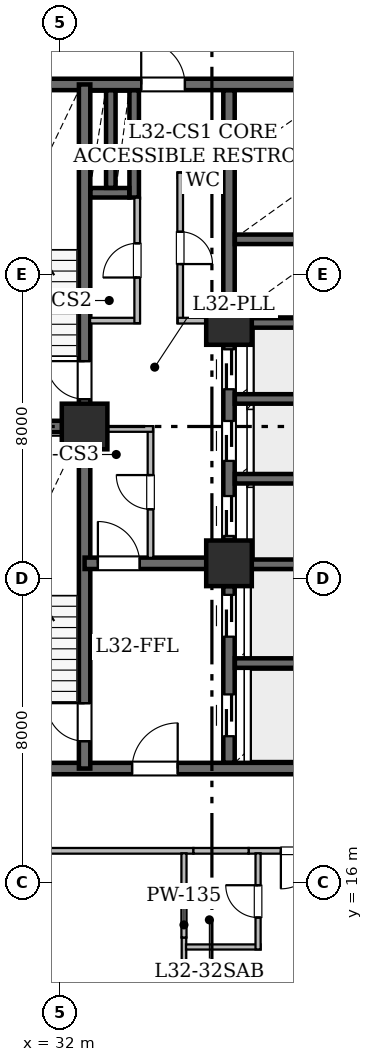
"""IFC4 building model, lengths in metres.
Left out: names, types, materials, properties, quantities, classifications, styles, units other than length and angle.
Written with IfcOpenShell. Run it as: python <this file> out.ifc"""

import sys

from ifc_helpers import new_model, si_unit, direction, frame, frame_2d, origin, origin_2d, place, context, subcontext, project, spatial, rectangle, hollow_rectangle, extrude, element, fill, save


model = new_model("IFC4")
c1 = context("Model", 3, precision=1e-05, world=origin(), true_north=direction((0.0, 1.0)))
c2 = subcontext(c1, "Body", "Model", "MODEL_VIEW")
j1 = project(units=[si_unit("LENGTHUNIT", "METRE"), si_unit("PLANEANGLEUNIT", "RADIAN")], contexts=[c1])
p1 = place(None, origin())
s1 = spatial("IfcSite", under=j1, at=p1, CompositionType="ELEMENT")
p2 = place(p1, origin())
s2 = spatial("IfcBuilding", under=s1, at=p2, CompositionType="ELEMENT")
p3 = place(p2, frame((0.0, 0.0, 127.45)))
s3 = spatial("IfcBuildingStorey", under=s2, at=p3, CompositionType="ELEMENT", Elevation=127.45)
for number, where, z_axis, x_axis in (
    (1, (32.65, 28.0, 0.0), (0.0, 0.0, 1.0), (1.0, 0.0, 0.0)),
    (2, (36.45, 24.4, 0.0), (0.0, 0.0, 1.0), (1.0, 0.0, 0.0)),
    (3, (36.45, 30.75, 0.0), (0.0, 0.0, 1.0), (1.0, 0.0, 0.0)),
):
    element("IfcColumn", number, at=place(p3, frame(where, z_axis=z_axis, x_axis=x_axis)), inside=s3, PredefinedType="COLUMN", context=c2, shape_type="SweptSolid", body=[
        extrude(hollow_rectangle(XDim=1.2, YDim=1.2, WallThickness=0.06, at=origin_2d()), origin(), (0.0, 0.0, 1.0), 3.65),
    ])
p4 = place(p3, frame((29.0, 19.0, 0.0), z_axis=(0.0, 0.0, 1.0), x_axis=(1.0, 0.0, 0.0)))
e4 = element("IfcWall", 4, at=p4, inside=s3, PredefinedType="SHEAR", context=c2, shape_type="SweptSolid", body=[
    extrude(rectangle(XDim=10.4, YDim=0.3, at=frame_2d((5.2, 0.0))), origin(), (0.0, 0.0, 1.0), 3.43),
])
p5 = place(p4, frame((4.9, 0.0, 0.0)))
e5 = element("IfcOpeningElement", 5, at=p5, cuts=e4, PredefinedType="OPENING", context=c2, shape_type="SweptSolid", body=[
    extrude(rectangle(XDim=1.2, YDim=2.15, at=frame_2d((0.6, 1.075))), frame((0.0, 0.16, 0.0), z_axis=(0.0, -1.0, 0.0), x_axis=(1.0, 0.0, 0.0)), (0.0, 0.0, 1.0), 0.32),
])
p6 = place(p3, frame((29.0, 37.0, 0.0), z_axis=(0.0, 0.0, 1.0), x_axis=(1.0, 0.0, 0.0)))
e6 = element("IfcWall", 6, at=p6, inside=s3, PredefinedType="SHEAR", context=c2, shape_type="SweptSolid", body=[
    extrude(rectangle(XDim=10.4, YDim=0.3, at=frame_2d((5.2, 0.0))), origin(), (0.0, 0.0, 1.0), 3.43),
])
p7 = place(p6, frame((5.14, 0.0, 0.0)))
e7 = element("IfcOpeningElement", 7, at=p7, cuts=e6, PredefinedType="OPENING", context=c2, shape_type="SweptSolid", body=[
    extrude(rectangle(XDim=1.15, YDim=2.2, at=frame_2d((0.575, 1.1))), frame((0.0, 0.16, 0.0), z_axis=(0.0, -1.0, 0.0), x_axis=(1.0, 0.0, 0.0)), (0.0, 0.0, 1.0), 0.32),
])
p8 = place(p3, frame((32.65, 19.0, 0.0), z_axis=(0.0, 0.0, 1.0), x_axis=(0.0, 1.0, 0.0)))
e8 = element("IfcWall", 8, at=p8, inside=s3, PredefinedType="SHEAR", context=c2, shape_type="SweptSolid", body=[
    extrude(rectangle(XDim=9.0, YDim=0.3, at=frame_2d((4.5, 0.0))), origin(), (0.0, 0.0, 1.0), 3.43),
])
p9 = place(p8, frame((0.72, 0.0, 0.0)))
e9 = element("IfcOpeningElement", 9, at=p9, cuts=e8, PredefinedType="OPENING", context=c2, shape_type="SweptSolid", body=[
    extrude(rectangle(XDim=1.0, YDim=2.15, at=frame_2d((0.5, 1.075))), frame((0.0, 0.16, 0.0), z_axis=(0.0, -1.0, 0.0), x_axis=(1.0, 0.0, 0.0)), (0.0, 0.0, 1.0), 0.32),
])
p10 = place(p3, frame((32.65, 28.0, 0.0), z_axis=(0.0, 0.0, 1.0), x_axis=(0.0, 1.0, 0.0)))
e10 = element("IfcWall", 10, at=p10, inside=s3, PredefinedType="SHEAR", context=c2, shape_type="SweptSolid", body=[
    extrude(rectangle(XDim=9.0, YDim=0.3, at=frame_2d((4.5, 0.0))), origin(), (0.0, 0.0, 1.0), 3.43),
])
p11 = place(p10, frame((0.72, 0.0, 0.0)))
e11 = element("IfcOpeningElement", 11, at=p11, cuts=e10, PredefinedType="OPENING", context=c2, shape_type="SweptSolid", body=[
    extrude(rectangle(XDim=1.0, YDim=2.15, at=frame_2d((0.5, 1.075))), frame((0.0, 0.16, 0.0), z_axis=(0.0, -1.0, 0.0), x_axis=(1.0, 0.0, 0.0)), (0.0, 0.0, 1.0), 0.32),
])
p12 = place(p3, frame((29.0, 28.0, 0.0), z_axis=(0.0, 0.0, 1.0), x_axis=(1.0, 0.0, 0.0)))
e12 = element("IfcWall", 12, at=p12, inside=s3, PredefinedType="SHEAR", context=c2, shape_type="SweptSolid", body=[
    extrude(rectangle(XDim=3.65, YDim=0.3, at=frame_2d((1.825, 0.0))), origin(), (0.0, 0.0, 1.0), 3.43),
])
p13 = place(p3, frame((32.65, 24.4, 0.0), z_axis=(0.0, 0.0, 1.0), x_axis=(1.0, 0.0, 0.0)))
e13 = element("IfcWall", 13, at=p13, inside=s3, PredefinedType="SHEAR", context=c2, shape_type="SweptSolid", body=[
    extrude(rectangle(XDim=3.8, YDim=0.3, at=frame_2d((1.9, 0.0))), origin(), (0.0, 0.0, 1.0), 3.43),
])
p14 = place(p13, frame((0.35, 0.0, 0.0)))
e14 = element("IfcOpeningElement", 14, at=p14, cuts=e13, PredefinedType="OPENING", context=c2, shape_type="SweptSolid", body=[
    extrude(rectangle(XDim=1.1, YDim=2.15, at=frame_2d((0.55, 1.075))), frame((0.0, 0.16, 0.0), z_axis=(0.0, -1.0, 0.0), x_axis=(1.0, 0.0, 0.0)), (0.0, 0.0, 1.0), 0.32),
])
p15 = place(p3, frame((36.45, 19.154, 0.0), z_axis=(0.0, 0.0, 1.0), x_axis=(0.0, 1.0, 0.0)))
e15 = element("IfcWall", 15, at=p15, inside=s3, PredefinedType="SHEAR", context=c2, shape_type="SweptSolid", body=[
    extrude(rectangle(XDim=4.646, YDim=0.3, at=frame_2d((2.323, 0.0))), origin(), (0.0, 0.0, 1.0), 3.43),
])
p16 = place(p15, frame((0.696, 0.0, 0.0)))
e16 = element("IfcOpeningElement", 16, at=p16, cuts=e15, PredefinedType="OPENING", context=c2, shape_type="SweptSolid", body=[
    extrude(rectangle(XDim=1.1, YDim=2.15, at=frame_2d((0.55, 1.075))), frame((0.0, 0.16, 0.0), z_axis=(0.0, -1.0, 0.0), x_axis=(1.0, 0.0, 0.0)), (0.0, 0.0, 1.0), 0.32),
])
p17 = place(p15, frame((3.316, 0.0, 0.0)))
e17 = element("IfcOpeningElement", 17, at=p17, cuts=e15, PredefinedType="OPENING", context=c2, shape_type="SweptSolid", body=[
    extrude(rectangle(XDim=1.1, YDim=2.15, at=frame_2d((0.55, 1.075))), frame((0.0, 0.16, 0.0), z_axis=(0.0, -1.0, 0.0), x_axis=(1.0, 0.0, 0.0)), (0.0, 0.0, 1.0), 0.32),
])
p18 = place(p3, frame((36.45, 25.0, 0.0), z_axis=(0.0, 0.0, 1.0), x_axis=(0.0, 1.0, 0.0)))
e18 = element("IfcWall", 18, at=p18, inside=s3, PredefinedType="SHEAR", context=c2, shape_type="SweptSolid", body=[
    extrude(rectangle(XDim=5.15, YDim=0.3, at=frame_2d((2.575, 0.0))), origin(), (0.0, 0.0, 1.0), 3.43),
])
p19 = place(p18, frame((0.12, 0.0, 0.0)))
e19 = element("IfcOpeningElement", 19, at=p19, cuts=e18, PredefinedType="OPENING", context=c2, shape_type="SweptSolid", body=[
    extrude(rectangle(XDim=1.05, YDim=2.15, at=frame_2d((0.525, 1.075))), frame((0.0, 0.16, 0.0), z_axis=(0.0, -1.0, 0.0), x_axis=(1.0, 0.0, 0.0)), (0.0, 0.0, 1.0), 0.32),
])
p20 = place(p18, frame((2.095, 0.0, 0.0)))
e20 = element("IfcOpeningElement", 20, at=p20, cuts=e18, PredefinedType="OPENING", context=c2, shape_type="SweptSolid", body=[
    extrude(rectangle(XDim=1.05, YDim=2.15, at=frame_2d((0.525, 1.075))), frame((0.0, 0.16, 0.0), z_axis=(0.0, -1.0, 0.0), x_axis=(1.0, 0.0, 0.0)), (0.0, 0.0, 1.0), 0.32),
])
p21 = place(p18, frame((3.98, 0.0, 0.0)))
e21 = element("IfcOpeningElement", 21, at=p21, cuts=e18, PredefinedType="OPENING", context=c2, shape_type="SweptSolid", body=[
    extrude(rectangle(XDim=1.05, YDim=2.15, at=frame_2d((0.525, 1.075))), frame((0.0, 0.16, 0.0), z_axis=(0.0, -1.0, 0.0), x_axis=(1.0, 0.0, 0.0)), (0.0, 0.0, 1.0), 0.32),
])
p22 = place(p3, frame((36.45, 31.35, 0.0), z_axis=(0.0, 0.0, 1.0), x_axis=(0.0, 1.0, 0.0)))
e22 = element("IfcWall", 22, at=p22, inside=s3, PredefinedType="SHEAR", context=c2, shape_type="SweptSolid", body=[
    extrude(rectangle(XDim=5.496, YDim=0.3, at=frame_2d((2.748, 0.0))), origin(), (0.0, 0.0, 1.0), 3.43),
])
for number, where, z_axis, x_axis in (
    (23, (36.604, 21.775, 0.0), (0.0, 0.0, 1.0), (1.0, 0.0, 0.0)),
    (24, (36.604, 24.375, 0.0), (0.0, 0.0, 1.0), (1.0, 0.0, 0.0)),
    (25, (36.604, 26.625, 0.0), (0.0, 0.0, 1.0), (1.0, 0.0, 0.0)),
    (26, (36.604, 28.725, 0.0), (0.0, 0.0, 1.0), (1.0, 0.0, 0.0)),
    (27, (36.604, 30.725, 0.0), (0.0, 0.0, 1.0), (1.0, 0.0, 0.0)),
    (28, (36.604, 32.925, 0.0), (0.0, 0.0, 1.0), (1.0, 0.0, 0.0)),
    (29, (36.604, 34.975, 0.0), (0.0, 0.0, 1.0), (1.0, 0.0, 0.0)),
):
    element("IfcWall", number, at=place(p3, frame(where, z_axis=z_axis, x_axis=x_axis)), inside=s3, PredefinedType="SHEAR", context=c2, shape_type="SweptSolid", body=[
        extrude(rectangle(XDim=2.642, YDim=0.25, at=frame_2d((1.321, 0.0))), origin(), (0.0, 0.0, 1.0), 3.43),
    ])
p23 = place(p3, frame((33.955, 34.025, 0.0), z_axis=(0.0, 0.0, 1.0), x_axis=(0.0, 1.0, 0.0)))
e30 = element("IfcWall", 30, at=p23, inside=s3, PredefinedType="SHEAR", context=c2, shape_type="SweptSolid", body=[
    extrude(rectangle(XDim=2.821, YDim=0.25, at=frame_2d((1.411, 0.0))), origin(), (0.0, 0.0, 1.0), 3.43),
])
p24 = place(p3, frame((32.804, 34.15, 0.0), z_axis=(0.0, 0.0, 1.0), x_axis=(1.0, 0.0, 0.0)))
e31 = element("IfcWall", 31, at=p24, inside=s3, PredefinedType="SHEAR", context=c2, shape_type="SweptSolid", body=[
    extrude(rectangle(XDim=1.022, YDim=0.25, at=frame_2d((0.511, 0.0))), origin(), (0.0, 0.0, 1.0), 3.43),
])
p25 = place(p3, frame((33.34, 34.279, 0.0), z_axis=(0.0, 0.0, 1.0), x_axis=(0.0, 1.0, 0.0)))
e32 = element("IfcWall", 32, at=p25, inside=s3, PredefinedType="SHEAR", context=c2, shape_type="SweptSolid", body=[
    extrude(rectangle(XDim=2.567, YDim=0.25, at=frame_2d((1.283, 0.0))), origin(), (0.0, 0.0, 1.0), 3.43),
])
p26 = place(p3, frame((36.306, 34.615, 0.0), z_axis=(0.0, 0.0, 1.0), x_axis=(-1.0, 0.0, 0.0)))
e33 = element("IfcWall", 33, at=p26, inside=s3, PredefinedType="STANDARD", context=c2, shape_type="SweptSolid", body=[
    extrude(rectangle(XDim=1.206, YDim=0.15, at=frame_2d((0.603, 0.0))), origin(), (0.0, 0.0, 1.0), 3.43),
])
p27 = place(p3, frame((35.165, 34.678, 0.0), z_axis=(0.0, 0.0, 1.0), x_axis=(0.0, -1.0, 0.0)))
e34 = element("IfcWall", 34, at=p27, inside=s3, PredefinedType="STANDARD", context=c2, shape_type="SweptSolid", body=[
    extrude(rectangle(XDim=3.958, YDim=0.15, at=frame_2d((1.979, 0.0))), origin(), (0.0, 0.0, 1.0), 3.43),
])
p28 = place(p27, frame((1.554, 0.0, 0.0)))
e35 = element("IfcOpeningElement", 35, at=p28, cuts=e34, PredefinedType="OPENING", context=c2, shape_type="SweptSolid", body=[
    extrude(rectangle(XDim=0.85, YDim=2.1, at=frame_2d((0.425, 1.05))), frame((0.0, 0.085, 0.0), z_axis=(0.0, -1.0, 0.0), x_axis=(1.0, 0.0, 0.0)), (0.0, 0.0, 1.0), 0.17),
])
p29 = place(p3, frame((35.102, 30.785, 0.0), z_axis=(0.0, 0.0, 1.0), x_axis=(1.0, 0.0, 0.0)))
e36 = element("IfcWall", 36, at=p29, inside=s3, PredefinedType="STANDARD", context=c2, shape_type="SweptSolid", body=[
    extrude(rectangle(XDim=1.198, YDim=0.15, at=frame_2d((0.599, 0.0))), origin(), (0.0, 0.0, 1.0), 3.43),
])
p30 = place(p3, frame((32.794, 30.785, 0.0), z_axis=(0.0, 0.0, 1.0), x_axis=(1.0, 0.0, 0.0)))
e37 = element("IfcWall", 37, at=p30, inside=s3, PredefinedType="STANDARD", context=c2, shape_type="SweptSolid", body=[
    extrude(rectangle(XDim=1.306, YDim=0.15, at=frame_2d((0.653, 0.0))), origin(), (0.0, 0.0, 1.0), 2.887),
])
p31 = place(p3, frame((34.035, 30.72, 0.0), z_axis=(0.0, 0.0, 1.0), x_axis=(0.0, 1.0, 0.0)))
e38 = element("IfcWall", 38, at=p31, inside=s3, PredefinedType="STANDARD", context=c2, shape_type="SweptSolid", body=[
    extrude(rectangle(XDim=3.3, YDim=0.15, at=frame_2d((1.65, 0.0))), origin(), (0.0, 0.0, 1.0), 3.43),
])
p32 = place(p31, frame((1.2, 0.0, 0.0)))
e39 = element("IfcOpeningElement", 39, at=p32, cuts=e38, PredefinedType="OPENING", context=c2, shape_type="SweptSolid", body=[
    extrude(rectangle(XDim=0.9, YDim=2.1, at=frame_2d((0.45, 1.05))), frame((0.0, 0.085, 0.0), z_axis=(0.0, -1.0, 0.0), x_axis=(1.0, 0.0, 0.0)), (0.0, 0.0, 1.0), 0.17),
])
p33 = place(p3, frame((34.385, 24.544, 0.0), z_axis=(0.0, 0.0, 1.0), x_axis=(0.0, 1.0, 0.0)))
e40 = element("IfcWall", 40, at=p33, inside=s3, PredefinedType="STANDARD", context=c2, shape_type="SweptSolid", body=[
    extrude(rectangle(XDim=3.456, YDim=0.15, at=frame_2d((1.728, 0.0))), origin(), (0.0, 0.0, 1.0), 3.43),
])
p34 = place(p33, frame((1.278, 0.0, 0.0)))
e41 = element("IfcOpeningElement", 41, at=p34, cuts=e40, PredefinedType="OPENING", context=c2, shape_type="SweptSolid", body=[
    extrude(rectangle(XDim=0.9, YDim=2.1, at=frame_2d((0.45, 1.05))), frame((0.0, 0.085, 0.0), z_axis=(0.0, -1.0, 0.0), x_axis=(1.0, 0.0, 0.0)), (0.0, 0.0, 1.0), 0.17),
])
p35 = place(p3, frame((34.45, 27.935, 0.0), z_axis=(0.0, 0.0, 1.0), x_axis=(-1.0, 0.0, 0.0)))
e42 = element("IfcWall", 42, at=p35, inside=s3, PredefinedType="STANDARD", context=c2, shape_type="SweptSolid", body=[
    extrude(rectangle(XDim=1.656, YDim=0.15, at=frame_2d((0.828, 0.0))), origin(), (0.0, 0.0, 1.0), 2.887),
])
p36 = place(p3, frame((35.514, 16.835, 0.0), z_axis=(0.0, 0.0, 1.0), x_axis=(-1.0, 0.0, 0.0)))
e43 = element("IfcWall", 43, at=p36, inside=s3, PredefinedType="STANDARD", context=c2, shape_type="SweptSolid", body=[
    extrude(rectangle(XDim=8.614, YDim=0.15, at=frame_2d((4.307, 0.0))), origin(), (0.0, 0.0, 1.0), 2.647),
])
p37 = place(p36, frame((3.753, 0.0, 0.0)))
e44 = element("IfcOpeningElement", 44, at=p37, cuts=e43, PredefinedType="OPENING", context=c2, shape_type="SweptSolid", body=[
    extrude(rectangle(XDim=1.15, YDim=2.2, at=frame_2d((0.575, 1.1))), frame((0.0, 0.085, 0.0), z_axis=(0.0, -1.0, 0.0), x_axis=(1.0, 0.0, 0.0)), (0.0, 0.0, 1.0), 0.17),
])
p38 = place(p3, frame((39.664, 16.835, 0.0), z_axis=(0.0, 0.0, 1.0), x_axis=(-1.0, 0.0, 0.0)))
e45 = element("IfcWall", 45, at=p38, inside=s3, PredefinedType="STANDARD", context=c2, shape_type="SweptSolid", body=[
    extrude(rectangle(XDim=2.698, YDim=0.15, at=frame_2d((1.349, 0.0))), origin(), (0.0, 0.0, 1.0), 2.647),
])
p39 = place(p38, frame((0.849, 0.0, 0.0)))
e46 = element("IfcOpeningElement", 46, at=p39, cuts=e45, PredefinedType="OPENING", context=c2, shape_type="SweptSolid", body=[
    extrude(rectangle(XDim=1.0, YDim=2.15, at=frame_2d((0.5, 1.075))), frame((0.0, 0.085, 0.0), z_axis=(0.0, -1.0, 0.0), x_axis=(1.0, 0.0, 0.0)), (0.0, 0.0, 1.0), 0.17),
])
p40 = place(p3, frame((36.966, 16.835, 0.0), z_axis=(0.0, 0.0, 1.0), x_axis=(-1.0, 0.0, 0.0)))
e47 = element("IfcWall", 47, at=p40, inside=s3, PredefinedType="STANDARD", context=c2, shape_type="SweptSolid", body=[
    extrude(rectangle(XDim=1.452, YDim=0.15, at=frame_2d((0.726, 0.0))), origin(), (0.0, 0.0, 1.0), 3.43),
])
p41 = place(p3, frame((35.265, 14.554, 0.0), z_axis=(0.0, 0.0, 1.0), x_axis=(0.0, -1.0, 0.0)))
e48 = element("IfcWall", 48, at=p41, inside=s3, PredefinedType="PARTITIONING", context=c2, shape_type="SweptSolid", body=[
    extrude(rectangle(XDim=2.078, YDim=0.12, at=frame_2d((1.039, 0.0))), origin(), (0.0, 0.0, 1.0), 3.43),
])
p42 = place(p3, frame((35.265, 16.77, 0.0), z_axis=(0.0, 0.0, 1.0), x_axis=(0.0, -1.0, 0.0)))
e49 = element("IfcWall", 49, at=p42, inside=s3, PredefinedType="PARTITIONING", context=c2, shape_type="SweptSolid", body=[
    extrude(rectangle(XDim=2.216, YDim=0.135, at=frame_2d((1.108, 0.0))), origin(), (0.0, 0.0, 1.0), 3.43),
])
p43 = place(p3, frame((35.319, 14.305, 0.0), z_axis=(0.0, 0.0, 1.0), x_axis=(1.0, 0.0, 0.0)))
e50 = element("IfcWall", 50, at=p43, inside=s3, PredefinedType="PARTITIONING", context=c2, shape_type="SweptSolid", body=[
    extrude(rectangle(XDim=1.961, YDim=0.135, at=frame_2d((0.98, 0.0))), origin(), (0.0, 0.0, 1.0), 3.43),
])
p44 = place(p3, frame((37.215, 14.24, 0.0), z_axis=(0.0, 0.0, 1.0), x_axis=(0.0, 1.0, 0.0)))
e51 = element("IfcWall", 51, at=p44, inside=s3, PredefinedType="PARTITIONING", context=c2, shape_type="SweptSolid", body=[
    extrude(rectangle(XDim=2.53, YDim=0.135, at=frame_2d((1.265, 0.0))), origin(), (0.0, 0.0, 1.0), 3.43),
])
p45 = place(p44, frame((0.84, 0.0, 0.0)))
e52 = element("IfcOpeningElement", 52, at=p45, cuts=e51, PredefinedType="OPENING", context=c2, shape_type="SweptSolid", body=[
    extrude(rectangle(XDim=0.85, YDim=2.1, at=frame_2d((0.425, 1.05))), frame((0.0, 0.077, 0.0), z_axis=(0.0, -1.0, 0.0), x_axis=(1.0, 0.0, 0.0)), (0.0, 0.0, 1.0), 0.155),
])
p46 = place(p9, origin())
e53 = element("IfcDoor", 53, at=p46, inside=s3, OperationType="SINGLE_SWING_RIGHT", PredefinedType="DOOR", context=c2, shape_type="SweptSolid", body=[
    extrude(rectangle(XDim=1.0, YDim=2.15, at=frame_2d((0.5, 1.075))), frame((0.0, 0.025, 0.0), z_axis=(0.0, -1.0, 0.0), x_axis=(1.0, 0.0, 0.0)), (0.0, 0.0, 1.0), 0.05),
])
fill(e9, e53)
p47 = place(p11, origin())
e54 = element("IfcDoor", 54, at=p47, inside=s3, OperationType="SINGLE_SWING_RIGHT", PredefinedType="DOOR", context=c2, shape_type="SweptSolid", body=[
    extrude(rectangle(XDim=1.0, YDim=2.15, at=frame_2d((0.5, 1.075))), frame((0.0, 0.025, 0.0), z_axis=(0.0, -1.0, 0.0), x_axis=(1.0, 0.0, 0.0)), (0.0, 0.0, 1.0), 0.05),
])
fill(e11, e54)
p48 = place(p14, origin())
e55 = element("IfcDoor", 55, at=p48, inside=s3, OperationType="SINGLE_SWING_LEFT", PredefinedType="DOOR", context=c2, shape_type="SweptSolid", body=[
    extrude(rectangle(XDim=1.1, YDim=2.15, at=frame_2d((0.55, 1.075))), frame((0.0, 0.025, 0.0), z_axis=(0.0, -1.0, 0.0), x_axis=(1.0, 0.0, 0.0)), (0.0, 0.0, 1.0), 0.05),
])
fill(e14, e55)
p49 = place(p5, origin())
e56 = element("IfcDoor", 56, at=p49, inside=s3, OperationType="SINGLE_SWING_RIGHT", PredefinedType="DOOR", context=c2, shape_type="SweptSolid", body=[
    extrude(rectangle(XDim=1.2, YDim=2.15, at=frame_2d((0.6, 1.075))), frame((0.0, 0.025, 0.0), z_axis=(0.0, -1.0, 0.0), x_axis=(1.0, 0.0, 0.0)), (0.0, 0.0, 1.0), 0.05),
])
fill(e5, e56)
p50 = place(p7, origin())
e57 = element("IfcDoor", 57, at=p50, inside=s3, OperationType="SINGLE_SWING_LEFT", PredefinedType="DOOR", context=c2, shape_type="SweptSolid", body=[
    extrude(rectangle(XDim=1.15, YDim=2.2, at=frame_2d((0.575, 1.1))), frame((0.0, 0.025, 0.0), z_axis=(0.0, -1.0, 0.0), x_axis=(1.0, 0.0, 0.0)), (0.0, 0.0, 1.0), 0.05),
])
fill(e7, e57)
p51 = place(p16, origin())
e58 = element("IfcDoor", 58, at=p51, inside=s3, OperationType="SLIDING_TO_LEFT", PredefinedType="DOOR", context=c2, shape_type="SweptSolid", body=[
    extrude(rectangle(XDim=1.1, YDim=2.15, at=frame_2d((0.55, 1.075))), frame((0.0, 0.025, 0.0), z_axis=(0.0, -1.0, 0.0), x_axis=(1.0, 0.0, 0.0)), (0.0, 0.0, 1.0), 0.05),
])
fill(e16, e58)
p52 = place(p17, origin())
e59 = element("IfcDoor", 59, at=p52, inside=s3, OperationType="SLIDING_TO_LEFT", PredefinedType="DOOR", context=c2, shape_type="SweptSolid", body=[
    extrude(rectangle(XDim=1.1, YDim=2.15, at=frame_2d((0.55, 1.075))), frame((0.0, 0.025, 0.0), z_axis=(0.0, -1.0, 0.0), x_axis=(1.0, 0.0, 0.0)), (0.0, 0.0, 1.0), 0.05),
])
fill(e17, e59)
p53 = place(p19, origin())
e60 = element("IfcDoor", 60, at=p53, inside=s3, OperationType="SLIDING_TO_LEFT", PredefinedType="DOOR", context=c2, shape_type="SweptSolid", body=[
    extrude(rectangle(XDim=1.05, YDim=2.15, at=frame_2d((0.525, 1.075))), frame((0.0, 0.025, 0.0), z_axis=(0.0, -1.0, 0.0), x_axis=(1.0, 0.0, 0.0)), (0.0, 0.0, 1.0), 0.05),
])
fill(e19, e60)
p54 = place(p20, origin())
e61 = element("IfcDoor", 61, at=p54, inside=s3, OperationType="SLIDING_TO_LEFT", PredefinedType="DOOR", context=c2, shape_type="SweptSolid", body=[
    extrude(rectangle(XDim=1.05, YDim=2.15, at=frame_2d((0.525, 1.075))), frame((0.0, 0.025, 0.0), z_axis=(0.0, -1.0, 0.0), x_axis=(1.0, 0.0, 0.0)), (0.0, 0.0, 1.0), 0.05),
])
fill(e20, e61)
p55 = place(p21, origin())
e62 = element("IfcDoor", 62, at=p55, inside=s3, OperationType="SLIDING_TO_LEFT", PredefinedType="DOOR", context=c2, shape_type="SweptSolid", body=[
    extrude(rectangle(XDim=1.05, YDim=2.15, at=frame_2d((0.525, 1.075))), frame((0.0, 0.025, 0.0), z_axis=(0.0, -1.0, 0.0), x_axis=(1.0, 0.0, 0.0)), (0.0, 0.0, 1.0), 0.05),
])
fill(e21, e62)
p56 = place(p28, origin())
e63 = element("IfcDoor", 63, at=p56, inside=s3, OperationType="SINGLE_SWING_RIGHT", PredefinedType="DOOR", context=c2, shape_type="SweptSolid", body=[
    extrude(rectangle(XDim=0.85, YDim=2.1, at=frame_2d((0.425, 1.05))), frame((0.0, 0.025, 0.0), z_axis=(0.0, -1.0, 0.0), x_axis=(1.0, 0.0, 0.0)), (0.0, 0.0, 1.0), 0.05),
])
fill(e35, e63)
p57 = place(p32, origin())
e64 = element("IfcDoor", 64, at=p57, inside=s3, OperationType="SINGLE_SWING_LEFT", PredefinedType="DOOR", context=c2, shape_type="SweptSolid", body=[
    extrude(rectangle(XDim=0.9, YDim=2.1, at=frame_2d((0.45, 1.05))), frame((0.0, 0.025, 0.0), z_axis=(0.0, -1.0, 0.0), x_axis=(1.0, 0.0, 0.0)), (0.0, 0.0, 1.0), 0.05),
])
fill(e39, e64)
p58 = place(p34, origin())
e65 = element("IfcDoor", 65, at=p58, inside=s3, OperationType="SINGLE_SWING_RIGHT", PredefinedType="DOOR", context=c2, shape_type="SweptSolid", body=[
    extrude(rectangle(XDim=0.9, YDim=2.1, at=frame_2d((0.45, 1.05))), frame((0.0, 0.025, 0.0), z_axis=(0.0, -1.0, 0.0), x_axis=(1.0, 0.0, 0.0)), (0.0, 0.0, 1.0), 0.05),
])
fill(e41, e65)
p59 = place(p39, origin())
e66 = element("IfcDoor", 66, at=p59, inside=s3, OperationType="SINGLE_SWING_RIGHT", PredefinedType="DOOR", context=c2, shape_type="SweptSolid", body=[
    extrude(rectangle(XDim=1.0, YDim=2.15, at=frame_2d((0.5, 1.075))), frame((0.0, 0.025, 0.0), z_axis=(0.0, -1.0, 0.0), x_axis=(1.0, 0.0, 0.0)), (0.0, 0.0, 1.0), 0.05),
])
fill(e46, e66)
p60 = place(p45, origin())
e67 = element("IfcDoor", 67, at=p60, inside=s3, OperationType="SINGLE_SWING_RIGHT", PredefinedType="DOOR", context=c2, shape_type="SweptSolid", body=[
    extrude(rectangle(XDim=0.85, YDim=2.1, at=frame_2d((0.425, 1.05))), frame((0.0, 0.025, 0.0), z_axis=(0.0, -1.0, 0.0), x_axis=(1.0, 0.0, 0.0)), (0.0, 0.0, 1.0), 0.05),
])
fill(e52, e67)
save(model, sys.argv[1])
